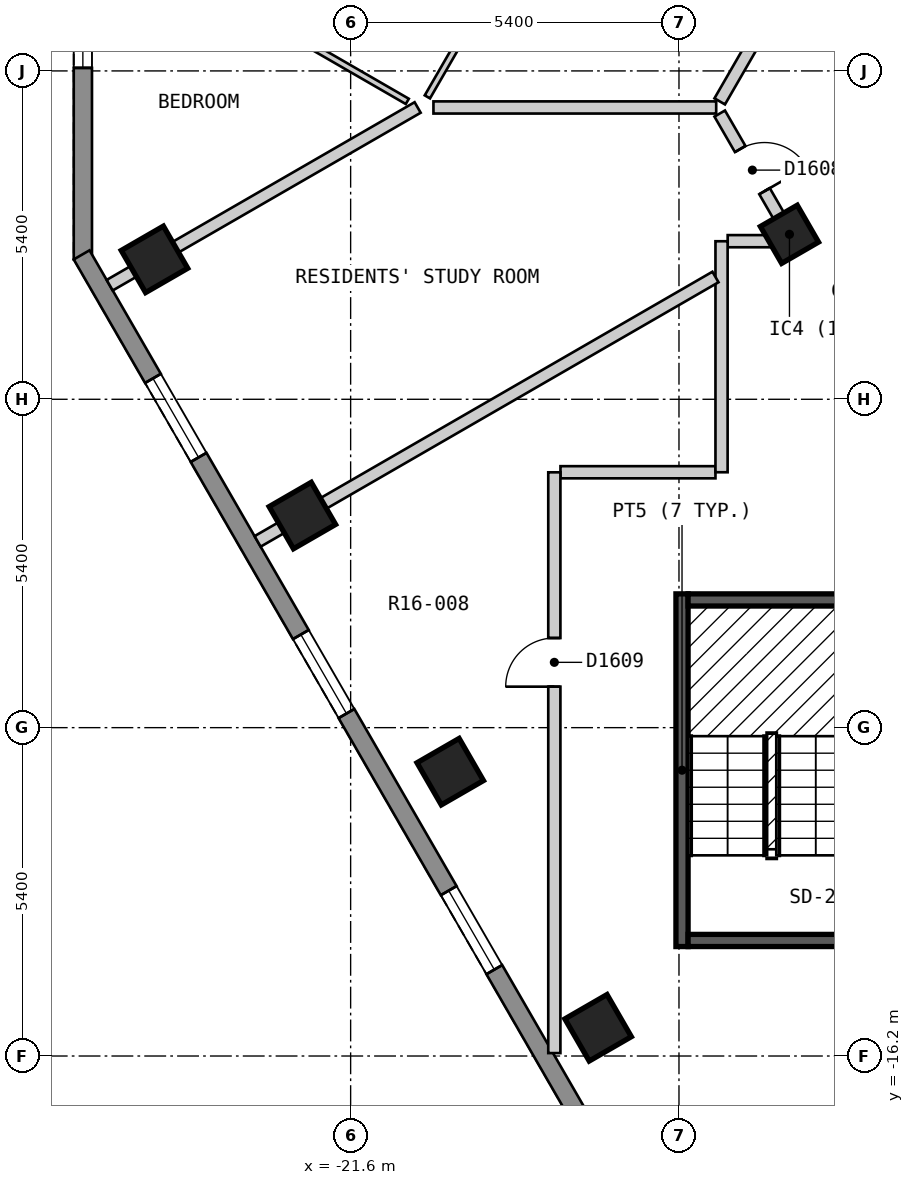
"""IFC4 building model, lengths in metres.
Left out: names, types, materials, properties, quantities, classifications, styles, units other than length and angle.
Written with IfcOpenShell. Run it as: python <this file> out.ifc"""

import sys

from ifc_helpers import new_model, si_unit, direction, frame, frame_2d, origin, origin_2d, place, context, subcontext, project, spatial, polyline, rectangle, outline, extrude, element, fill, save


model = new_model("IFC4")
c1 = context("Model", 3, precision=1e-05, world=origin(), true_north=direction((0.0, 1.0)))
c2 = subcontext(c1, "Body", "Model", "MODEL_VIEW")
j1 = project(units=[si_unit("LENGTHUNIT", "METRE"), si_unit("PLANEANGLEUNIT", "RADIAN")], contexts=[c1])
p1 = place(None, origin())
s1 = spatial("IfcSite", under=j1, at=p1, CompositionType="ELEMENT")
p2 = place(p1, origin())
s2 = spatial("IfcBuilding", under=s1, at=p2, CompositionType="ELEMENT")
p3 = place(p2, frame((0.0, 0.0, 169.2)))
s3 = spatial("IfcBuildingStorey", under=s2, at=p3, CompositionType="ELEMENT", Elevation=169.2)
for number, where, z_axis, x_axis in (
    (1, (-24.826, -3.099, 0.0), (0.0, 0.0, 1.0), (0.5, -0.866, 0.0)),
    (2, (-22.394, -7.312, 0.0), (0.0, 0.0, 1.0), (0.5, -0.866, 0.0)),
    (3, (-19.962, -11.524, 0.0), (0.0, 0.0, 1.0), (0.5, -0.866, 0.0)),
    (4, (-17.53, -15.736, 0.0), (0.0, 0.0, 1.0), (0.5, -0.866, 0.0)),
):
    element("IfcColumn", number, at=place(p3, frame(where, z_axis=z_axis, x_axis=x_axis)), inside=s3, PredefinedType="COLUMN", context=c2, shape_type="SweptSolid", body=[
        extrude(rectangle(XDim=0.8, YDim=0.8, at=origin_2d()), origin(), (0.0, 0.0, 1.0), 3.0),
    ])
p4 = place(p3, frame((-14.383, -2.687, 0.0), z_axis=(0.0, 0.0, 1.0), x_axis=(0.5, -0.866025403784, 0.0)))
e5 = element("IfcColumn", 5, at=p4, inside=s3, PredefinedType="COLUMN", context=c2, shape_type="SweptSolid", body=[
    extrude(rectangle(XDim=0.7, YDim=0.7, at=origin_2d()), origin(), (0.0, 0.0, 1.0), 3.0),
])
p5 = place(p3, frame((-26.004, 1.9, 0.0), z_axis=(0.0, 0.0, 1.0), x_axis=(0.0, -1.0, 0.0)))
e6 = element("IfcWall", 6, at=p5, inside=s3, PredefinedType="SOLIDWALL", context=c2, shape_type="SweptSolid", body=[
    extrude(outline(polyline([(0.0, -0.15), (5.0, -0.15), (4.92, 0.15), (0.08, 0.15), (0.0, -0.15)])), origin(), (0.0, 0.0, 1.0), 2.7),
])
p6 = place(p5, frame((0.65, 0.0, 0.15)))
e7 = element("IfcOpeningElement", 7, at=p6, cuts=e6, PredefinedType="OPENING", context=c2, shape_type="SweptSolid", body=[
    extrude(rectangle(XDim=1.2, YDim=2.1, at=frame_2d((0.6, 1.05))), frame((0.0, 0.16, 0.0), z_axis=(0.0, -1.0, 0.0), x_axis=(1.0, 0.0, 0.0)), (0.0, 0.0, 1.0), 0.32),
])
p7 = place(p3, frame((-26.024, -3.025, 0.0), z_axis=(0.0, 0.0, 1.0), x_axis=(0.500018670445, -0.86601462413, 0.0)))
e8 = element("IfcWall", 8, at=p7, inside=s3, PredefinedType="SOLIDWALL", context=c2, shape_type="SweptSolid", body=[
    extrude(outline(polyline([(0.0, -0.15), (20.785, -0.15), (20.705, 0.15), (0.08, 0.15), (0.0, -0.15)])), origin(), (0.0, 0.0, 1.0), 2.7),
])
p8 = place(p7, frame((2.346, 0.0, 0.15)))
e9 = element("IfcOpeningElement", 9, at=p8, cuts=e8, PredefinedType="OPENING", context=c2, shape_type="SweptSolid", body=[
    extrude(rectangle(XDim=1.5, YDim=2.1, at=frame_2d((0.75, 1.05))), frame((0.0, 0.16, 0.0), z_axis=(0.0, -1.0, 0.0), x_axis=(1.0, 0.0, 0.0)), (0.0, 0.0, 1.0), 0.32),
])
p9 = place(p7, frame((7.21, 0.0, 0.15)))
e10 = element("IfcOpeningElement", 10, at=p9, cuts=e8, PredefinedType="OPENING", context=c2, shape_type="SweptSolid", body=[
    extrude(rectangle(XDim=1.5, YDim=2.1, at=frame_2d((0.75, 1.05))), frame((0.0, 0.16, 0.0), z_axis=(0.0, -1.0, 0.0), x_axis=(1.0, 0.0, 0.0)), (0.0, 0.0, 1.0), 0.32),
])
p10 = place(p7, frame((12.073, 0.0, 0.15)))
e11 = element("IfcOpeningElement", 11, at=p10, cuts=e8, PredefinedType="OPENING", context=c2, shape_type="SweptSolid", body=[
    extrude(rectangle(XDim=1.5, YDim=2.1, at=frame_2d((0.75, 1.05))), frame((0.0, 0.16, 0.0), z_axis=(0.0, -1.0, 0.0), x_axis=(1.0, 0.0, 0.0)), (0.0, 0.0, 1.0), 0.32),
])
p11 = place(p7, frame((16.938, 0.0, 0.15)))
e12 = element("IfcOpeningElement", 12, at=p11, cuts=e8, PredefinedType="OPENING", context=c2, shape_type="SweptSolid", body=[
    extrude(rectangle(XDim=1.5, YDim=2.1, at=frame_2d((0.75, 1.05))), frame((0.0, 0.16, 0.0), z_axis=(0.0, -1.0, 0.0), x_axis=(1.0, 0.0, 0.0)), (0.0, 0.0, 1.0), 0.32),
])
p12 = place(p3, frame((-15.53, -0.701, 0.0), z_axis=(0.0, 0.0, 1.0), x_axis=(0.499972710878, -0.866041158593, 0.0)))
e13 = element("IfcWall", 13, at=p12, inside=s3, PredefinedType="PARTITIONING", context=c2, shape_type="SweptSolid", body=[
    extrude(rectangle(XDim=2.308, YDim=0.2, at=frame_2d((1.154, 0.0))), origin(), (0.0, 0.0, 1.0), 2.7),
])
p13 = place(p12, frame((0.674, 0.0, 0.0)))
e14 = element("IfcOpeningElement", 14, at=p13, cuts=e13, PredefinedType="OPENING", context=c2, shape_type="SweptSolid", body=[
    extrude(rectangle(XDim=0.8, YDim=2.1, at=frame_2d((0.4, 1.05))), frame((0.0, 0.11, 0.0), z_axis=(0.0, -1.0, 0.0), x_axis=(1.0, 0.0, 0.0)), (0.0, 0.0, 1.0), 0.22),
])
p14 = place(p3, frame((-18.149, -6.6, 0.0), z_axis=(0.0, 0.0, 1.0), x_axis=(1.0, 0.0, 0.0)))
e15 = element("IfcWall", 15, at=p14, inside=s3, PredefinedType="PARTITIONING", context=c2, shape_type="SweptSolid", body=[
    extrude(rectangle(XDim=2.549, YDim=0.2, at=frame_2d((1.274, 0.0))), origin(), (0.0, 0.0, 1.0), 2.7),
])
p15 = place(p3, frame((-15.399, -2.8, 0.0), z_axis=(0.0, 0.0, 1.0), x_axis=(1.0, 0.0, 0.0)))
e16 = element("IfcWall", 16, at=p15, inside=s3, PredefinedType="PARTITIONING", context=c2, shape_type="SweptSolid", body=[
    extrude(rectangle(XDim=1.081, YDim=0.2, at=frame_2d((0.541, 0.0))), origin(), (0.0, 0.0, 1.0), 2.7),
])
p16 = place(p3, frame((-15.53, -0.501, 0.0), z_axis=(0.0, 0.0, 1.0), x_axis=(0.499952498232, 0.866052827206, 0.0)))
e17 = element("IfcWall", 17, at=p16, inside=s3, PredefinedType="PARTITIONING", context=c2, shape_type="SweptSolid", body=[
    extrude(rectangle(XDim=9.585, YDim=0.2, at=frame_2d((4.792, 0.0))), origin(), (0.0, 0.0, 1.0), 2.7),
])
p17 = place(p16, frame((5.031, 0.0, 0.0)))
e18 = element("IfcOpeningElement", 18, at=p17, cuts=e17, PredefinedType="OPENING", context=c2, shape_type="SweptSolid", body=[
    extrude(rectangle(XDim=1.0, YDim=2.1, at=frame_2d((0.5, 1.05))), frame((0.0, 0.11, 0.0), z_axis=(0.0, -1.0, 0.0), x_axis=(1.0, 0.0, 0.0)), (0.0, 0.0, 1.0), 0.22),
])
p18 = place(p3, frame((-15.5, -6.6, 0.0), z_axis=(0.0, 0.0, 1.0), x_axis=(0.0, 1.0, 0.0)))
e19 = element("IfcWall", 19, at=p18, inside=s3, PredefinedType="PARTITIONING", context=c2, shape_type="SweptSolid", body=[
    extrude(rectangle(XDim=3.799, YDim=0.2, at=frame_2d((1.899, 0.0))), origin(), (0.0, 0.0, 1.0), 2.7),
])
p19 = place(p3, frame((-18.25, -16.152, 0.0), z_axis=(0.0, 0.0, 1.0), x_axis=(0.0, 1.0, 0.0)))
e20 = element("IfcWall", 20, at=p19, inside=s3, PredefinedType="PARTITIONING", context=c2, shape_type="SweptSolid", body=[
    extrude(rectangle(XDim=9.551, YDim=0.2, at=frame_2d((4.775, 0.0))), origin(), (0.0, 0.0, 1.0), 2.7),
])
p20 = place(p19, frame((6.026, 0.0, 0.0)))
e21 = element("IfcOpeningElement", 21, at=p20, cuts=e20, PredefinedType="OPENING", context=c2, shape_type="SweptSolid", body=[
    extrude(rectangle(XDim=0.8, YDim=2.1, at=frame_2d((0.4, 1.05))), frame((0.0, 0.11, 0.0), z_axis=(0.0, -1.0, 0.0), x_axis=(1.0, 0.0, 0.0)), (0.0, 0.0, 1.0), 0.22),
])
p21 = place(p3, frame((-25.562, 2.325, 0.0), z_axis=(0.0, 0.0, 1.0), x_axis=(0.865998530728, -0.500046542611, 0.0)))
e22 = element("IfcWall", 22, at=p21, inside=s3, PredefinedType="PARTITIONING", context=c2, shape_type="SweptSolid", body=[
    extrude(rectangle(XDim=5.651, YDim=0.1, at=frame_2d((2.826, 0.0))), origin(), (0.0, 0.0, 1.0), 2.7),
])
p22 = place(p21, frame((2.476, 0.0, 0.0)))
e23 = element("IfcOpeningElement", 23, at=p22, cuts=e22, PredefinedType="OPENING", context=c2, shape_type="SweptSolid", body=[
    extrude(rectangle(XDim=0.9, YDim=2.1, at=frame_2d((0.45, 1.05))), frame((0.0, 0.06, 0.0), z_axis=(0.0, -1.0, 0.0), x_axis=(1.0, 0.0, 0.0)), (0.0, 0.0, 1.0), 0.12),
])
p23 = place(p3, frame((-20.338, -0.427, 0.0), z_axis=(0.0, 0.0, 1.0), x_axis=(0.500069990121, 0.865984991198, 0.0)))
e24 = element("IfcWall", 24, at=p23, inside=s3, PredefinedType="PARTITIONING", context=c2, shape_type="SweptSolid", body=[
    extrude(rectangle(XDim=1.176, YDim=0.1, at=frame_2d((0.588, 0.0))), origin(), (0.0, 0.0, 1.0), 2.7),
])
p24 = place(p3, frame((-20.238, -0.601, 0.0), z_axis=(0.0, 0.0, 1.0), x_axis=(1.0, 0.0, 0.0)))
e25 = element("IfcWall", 25, at=p24, inside=s3, PredefinedType="PARTITIONING", context=c2, shape_type="SweptSolid", body=[
    extrude(rectangle(XDim=4.65, YDim=0.2, at=frame_2d((2.325, 0.0))), origin(), (0.0, 0.0, 1.0), 2.7),
])
p25 = place(p3, frame((-23.13, -7.737, 0.0), z_axis=(0.0, 0.0, 1.0), x_axis=(0.86598451299, 0.500070818246, 0.0)))
e26 = element("IfcWall", 26, at=p25, inside=s3, PredefinedType="PARTITIONING", context=c2, shape_type="SweptSolid", body=[
    extrude(rectangle(XDim=8.695, YDim=0.2, at=frame_2d((4.348, 0.0))), origin(), (0.0, 0.0, 1.0), 2.7),
])
p26 = place(p3, frame((-25.563, -3.524, 0.0), z_axis=(0.0, 0.0, 1.0), x_axis=(0.866128586522, 0.499821239653, 0.0)))
e27 = element("IfcWall", 27, at=p26, inside=s3, PredefinedType="PARTITIONING", context=c2, shape_type="SweptSolid", body=[
    extrude(rectangle(XDim=5.848, YDim=0.2, at=frame_2d((2.924, 0.0))), origin(), (0.0, 0.0, 1.0), 2.7),
])
p27 = place(p3, frame((-16.15, -14.4, 0.0), z_axis=(0.0, 0.0, 1.0), x_axis=(0.0, 1.0, 0.0)))
e28 = element("IfcWall", 28, at=p27, inside=s3, PredefinedType="SOLIDWALL", context=c2, shape_type="SweptSolid", body=[
    extrude(rectangle(XDim=5.8, YDim=0.2, at=frame_2d((2.9, 0.0))), origin(), (0.0, 0.0, 1.0), 2.7),
])
for number, where, z_axis, x_axis in (
    (29, (-16.05, -14.3, 0.0), (0.0, 0.0, 1.0), (1.0, 0.0, 0.0)),
    (30, (-16.05, -8.7, 0.0), (0.0, 0.0, 1.0), (1.0, 0.0, 0.0)),
):
    element("IfcWall", number, at=place(p3, frame(where, z_axis=z_axis, x_axis=x_axis)), inside=s3, PredefinedType="SOLIDWALL", context=c2, shape_type="SweptSolid", body=[
        extrude(rectangle(XDim=2.75, YDim=0.2, at=frame_2d((1.375, 0.0))), origin(), (0.0, 0.0, 1.0), 2.7),
    ])
p28 = place(p6, origin())
e31 = element("IfcWindow", 31, at=p28, inside=s3, PartitioningType="SINGLE_PANEL", PredefinedType="WINDOW", context=c2, shape_type="SweptSolid", body=[
    extrude(rectangle(XDim=1.2, YDim=2.1, at=frame_2d((0.6, 1.05))), frame((0.0, 0.03, 0.0), z_axis=(0.0, -1.0, 0.0), x_axis=(1.0, 0.0, 0.0)), (0.0, 0.0, 1.0), 0.06),
])
fill(e7, e31)
p29 = place(p8, origin())
e32 = element("IfcWindow", 32, at=p29, inside=s3, PartitioningType="SINGLE_PANEL", PredefinedType="WINDOW", context=c2, shape_type="SweptSolid", body=[
    extrude(rectangle(XDim=1.5, YDim=2.1, at=frame_2d((0.75, 1.05))), frame((0.0, 0.03, 0.0), z_axis=(0.0, -1.0, 0.0), x_axis=(1.0, 0.0, 0.0)), (0.0, 0.0, 1.0), 0.06),
])
fill(e9, e32)
p30 = place(p9, origin())
e33 = element("IfcWindow", 33, at=p30, inside=s3, PartitioningType="SINGLE_PANEL", PredefinedType="WINDOW", context=c2, shape_type="SweptSolid", body=[
    extrude(rectangle(XDim=1.5, YDim=2.1, at=frame_2d((0.75, 1.05))), frame((0.0, 0.03, 0.0), z_axis=(0.0, -1.0, 0.0), x_axis=(1.0, 0.0, 0.0)), (0.0, 0.0, 1.0), 0.06),
])
fill(e10, e33)
p31 = place(p10, origin())
e34 = element("IfcWindow", 34, at=p31, inside=s3, PartitioningType="SINGLE_PANEL", PredefinedType="WINDOW", context=c2, shape_type="SweptSolid", body=[
    extrude(rectangle(XDim=1.5, YDim=2.1, at=frame_2d((0.75, 1.05))), frame((0.0, 0.03, 0.0), z_axis=(0.0, -1.0, 0.0), x_axis=(1.0, 0.0, 0.0)), (0.0, 0.0, 1.0), 0.06),
])
fill(e11, e34)
p32 = place(p13, origin())
e35 = element("IfcDoor", 35, at=p32, inside=s3, OperationType="SINGLE_SWING_RIGHT", PredefinedType="DOOR", context=c2, shape_type="SweptSolid", body=[
    extrude(rectangle(XDim=0.8, YDim=2.1, at=frame_2d((0.4, 1.05))), frame((0.0, 0.025, 0.0), z_axis=(0.0, -1.0, 0.0), x_axis=(1.0, 0.0, 0.0)), (0.0, 0.0, 1.0), 0.05),
])
fill(e14, e35)
p33 = place(p20, origin())
e36 = element("IfcDoor", 36, at=p33, inside=s3, OperationType="SINGLE_SWING_LEFT", PredefinedType="DOOR", context=c2, shape_type="SweptSolid", body=[
    extrude(rectangle(XDim=0.8, YDim=2.1, at=frame_2d((0.4, 1.05))), frame((0.0, 0.025, 0.0), z_axis=(0.0, -1.0, 0.0), x_axis=(1.0, 0.0, 0.0)), (0.0, 0.0, 1.0), 0.05),
])
fill(e21, e36)
save(model, sys.argv[1])
